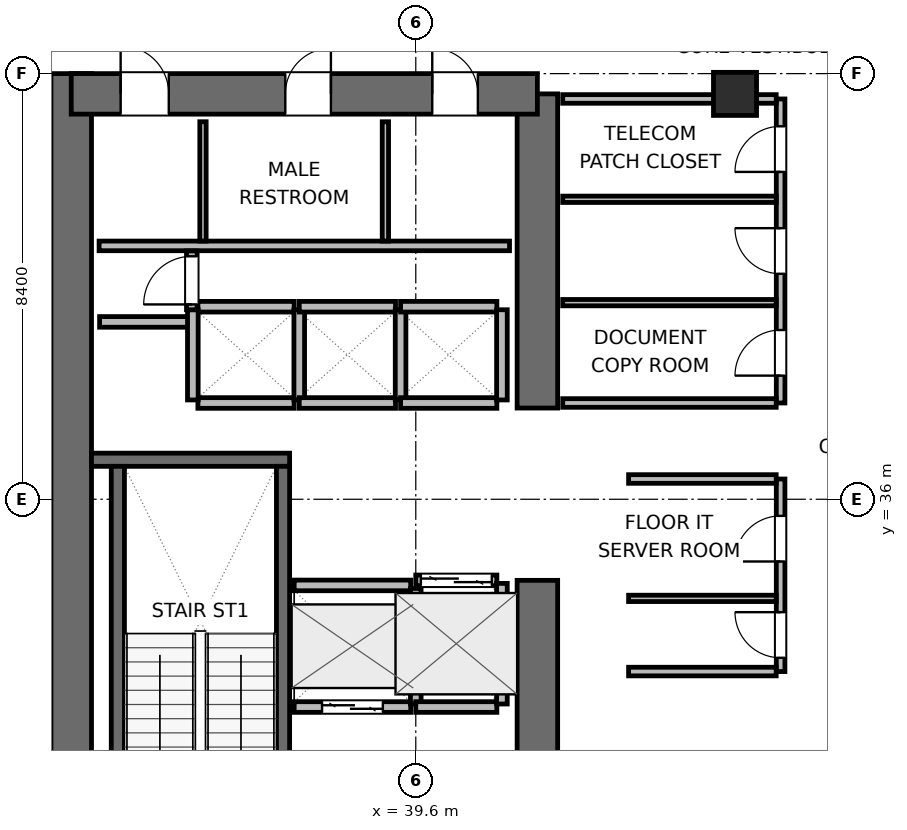
"""IFC4 building model, lengths in metres.
Left out: names, types, materials, properties, quantities, classifications, styles, units other than length and angle.
Written with IfcOpenShell. Run it as: python <this file> out.ifc"""

import sys

from ifc_helpers import new_model, si_unit, direction, frame, frame_2d, origin, origin_2d, place, context, subcontext, project, spatial, rectangle, extrude, element, fill, save


model = new_model("IFC4")
c1 = context("Model", 3, precision=1e-05, world=origin(), true_north=direction((0.0, 1.0)))
c2 = subcontext(c1, "Body", "Model", "MODEL_VIEW")
j1 = project(units=[si_unit("LENGTHUNIT", "METRE"), si_unit("PLANEANGLEUNIT", "RADIAN")], contexts=[c1])
p1 = place(None, origin())
s1 = spatial("IfcSite", under=j1, at=p1, CompositionType="ELEMENT")
p2 = place(p1, origin())
s2 = spatial("IfcBuilding", under=s1, at=p2, CompositionType="ELEMENT")
p3 = place(p2, frame((0.0, 0.0, 97.5)))
s3 = spatial("IfcBuildingStorey", under=s2, at=p3, CompositionType="ELEMENT", Elevation=97.5)
p4 = place(p3, frame((32.8, 27.6, 0.0), z_axis=(0.0, 0.0, 1.0), x_axis=(0.0, 1.0, 0.0)))
e1 = element("IfcWall", 1, at=p4, inside=s3, PredefinedType="SHEAR", context=c2, shape_type="SweptSolid", body=[
    extrude(rectangle(XDim=16.8, YDim=0.8, at=frame_2d((8.4, 0.0))), origin(), (0.0, 0.0, 1.0), 3.9),
])
p5 = place(p3, frame((42.0, 28.0, 0.0), z_axis=(0.0, 0.0, 1.0), x_axis=(0.0, 1.0, 0.0)))
e2 = element("IfcWall", 2, at=p5, inside=s3, PredefinedType="SHEAR", context=c2, shape_type="SweptSolid", body=[
    extrude(rectangle(XDim=6.4, YDim=0.8, at=frame_2d((3.2, 0.0))), origin(), (0.0, 0.0, 1.0), 3.9),
])
p6 = place(p3, frame((42.0, 37.8, 0.0), z_axis=(0.0, 0.0, 1.0), x_axis=(0.0, 1.0, 0.0)))
e3 = element("IfcWall", 3, at=p6, inside=s3, PredefinedType="SHEAR", context=c2, shape_type="SweptSolid", body=[
    extrude(rectangle(XDim=6.2, YDim=0.8, at=frame_2d((3.1, 0.0))), origin(), (0.0, 0.0, 1.0), 3.9),
])
p7 = place(p3, frame((32.8, 44.0, 0.0), z_axis=(0.0, 0.0, 1.0), x_axis=(1.0, 0.0, 0.0)))
e4 = element("IfcWall", 4, at=p7, inside=s3, PredefinedType="SHEAR", context=c2, shape_type="SweptSolid", body=[
    extrude(rectangle(XDim=9.2, YDim=0.8, at=frame_2d((4.6, 0.0))), origin(), (0.0, 0.0, 1.0), 3.9),
])
p8 = place(p7, frame((0.975, 0.0, 0.0)))
e5 = element("IfcOpeningElement", 5, at=p8, cuts=e4, PredefinedType="OPENING", context=c2, shape_type="SweptSolid", body=[
    extrude(rectangle(XDim=0.95, YDim=2.04, at=frame_2d((0.475, 1.02))), frame((0.0, 0.41, 0.0), z_axis=(0.0, -1.0, 0.0), x_axis=(1.0, 0.0, 0.0)), (0.0, 0.0, 1.0), 0.82),
])
p9 = place(p7, frame((4.225, 0.0, 0.0)))
e6 = element("IfcOpeningElement", 6, at=p9, cuts=e4, PredefinedType="OPENING", context=c2, shape_type="SweptSolid", body=[
    extrude(rectangle(XDim=0.9, YDim=2.02, at=frame_2d((0.45, 1.01))), frame((0.0, 0.41, 0.0), z_axis=(0.0, -1.0, 0.0), x_axis=(1.0, 0.0, 0.0)), (0.0, 0.0, 1.0), 0.82),
])
p10 = place(p7, frame((7.125, 0.0, 0.0)))
e7 = element("IfcOpeningElement", 7, at=p10, cuts=e4, PredefinedType="OPENING", context=c2, shape_type="SweptSolid", body=[
    extrude(rectangle(XDim=0.9, YDim=2.02, at=frame_2d((0.45, 1.01))), frame((0.0, 0.41, 0.0), z_axis=(0.0, -1.0, 0.0), x_axis=(1.0, 0.0, 0.0)), (0.0, 0.0, 1.0), 0.82),
])
p11 = place(p3, frame((33.2, 36.78, 0.0), z_axis=(0.0, 0.0, 1.0), x_axis=(1.0, 0.0, 0.0)))
e8 = element("IfcWall", 8, at=p11, inside=s3, PredefinedType="SHEAR", context=c2, shape_type="SweptSolid", body=[
    extrude(rectangle(XDim=3.91, YDim=0.26, at=frame_2d((1.955, 0.0))), origin(), (0.0, 0.0, 1.0), 3.9),
])
p12 = place(p3, frame((33.72, 29.05, 0.0), z_axis=(0.0, 0.0, 1.0), x_axis=(0.0, 1.0, 0.0)))
e9 = element("IfcWall", 9, at=p12, inside=s3, PredefinedType="SHEAR", context=c2, shape_type="SweptSolid", body=[
    extrude(rectangle(XDim=7.6, YDim=0.26, at=frame_2d((3.8, 0.0))), origin(), (0.0, 0.0, 1.0), 3.9),
])
p13 = place(p3, frame((36.98, 29.05, 0.0), z_axis=(0.0, 0.0, 1.0), x_axis=(0.0, 1.0, 0.0)))
e10 = element("IfcWall", 10, at=p13, inside=s3, PredefinedType="SHEAR", context=c2, shape_type="SweptSolid", body=[
    extrude(rectangle(XDim=7.6, YDim=0.26, at=frame_2d((3.8, 0.0))), origin(), (0.0, 0.0, 1.0), 3.9),
])
p14 = place(p13, frame((0.3, 0.0, 0.0)))
e11 = element("IfcOpeningElement", 11, at=p14, cuts=e10, PredefinedType="OPENING", context=c2, shape_type="SweptSolid", body=[
    extrude(rectangle(XDim=1.0, YDim=2.04, at=frame_2d((0.5, 1.02))), frame((0.0, 0.14, 0.0), z_axis=(0.0, -1.0, 0.0), x_axis=(1.0, 0.0, 0.0)), (0.0, 0.0, 1.0), 0.28),
])
p15 = place(p3, frame((45.9, 44.0, 0.0), z_axis=(0.0, 0.0, 1.0), x_axis=(1.0, 0.0, 0.0)))
e12 = element("IfcColumn", 12, at=p15, inside=s3, PredefinedType="COLUMN", context=c2, shape_type="SweptSolid", body=[
    extrude(rectangle(XDim=0.85, YDim=0.85, at=origin_2d()), origin(), (0.0, 0.0, 1.0), 3.9),
])
p16 = place(p3, frame((33.35, 41.0, 0.0), z_axis=(0.0, 0.0, 1.0), x_axis=(1.0, 0.0, 0.0)))
e13 = element("IfcWall", 13, at=p16, inside=s3, PredefinedType="PLUMBINGWALL", context=c2, shape_type="SweptSolid", body=[
    extrude(rectangle(XDim=8.1, YDim=0.19, at=frame_2d((4.05, 0.0))), origin(), (0.0, 0.0, 1.0), 3.64),
])
for number, where, z_axis, x_axis in (
    (14, (35.4, 41.095, 0.0), (0.0, 0.0, 1.0), (0.0, 1.0, 0.0)),
    (15, (39.0, 41.095, 0.0), (0.0, 0.0, 1.0), (0.0, 1.0, 0.0)),
):
    element("IfcWall", number, at=place(p3, frame(where, z_axis=z_axis, x_axis=x_axis)), inside=s3, PredefinedType="PARTITIONING", context=c2, shape_type="SweptSolid", body=[
        extrude(rectangle(XDim=2.355, YDim=0.125, at=frame_2d((1.177, 0.0))), origin(), (0.0, 0.0, 1.0), 3.64),
    ])
p17 = place(p3, frame((33.36, 39.5, 0.0), z_axis=(0.0, 0.0, 1.0), x_axis=(1.0, 0.0, 0.0)))
e16 = element("IfcWall", 16, at=p17, inside=s3, PredefinedType="PARTITIONING", context=c2, shape_type="SweptSolid", body=[
    extrude(rectangle(XDim=1.86, YDim=0.21, at=frame_2d((0.93, 0.0))), origin(), (0.0, 0.0, 1.0), 3.64),
])
p18 = place(p3, frame((37.2, 31.9, 0.0), z_axis=(0.0, 0.0, 1.0), x_axis=(1.0, 0.0, 0.0)))
e17 = element("IfcWall", 17, at=p18, inside=s3, PredefinedType="PARTITIONING", context=c2, shape_type="SweptSolid", body=[
    extrude(rectangle(XDim=2.3, YDim=0.21, at=frame_2d((1.15, 0.0))), origin(), (0.0, 0.0, 1.0), 3.64),
])
p19 = place(p18, frame((0.55, 0.0, 0.0)))
e18 = element("IfcOpeningElement", 18, at=p19, cuts=e17, PredefinedType="OPENING", context=c2, shape_type="SweptSolid", body=[
    extrude(rectangle(XDim=1.2, YDim=2.04, at=frame_2d((0.6, 1.02))), frame((0.0, 0.115, 0.0), z_axis=(0.0, -1.0, 0.0), x_axis=(1.0, 0.0, 0.0)), (0.0, 0.0, 1.0), 0.23),
])
p20 = place(p3, frame((37.2, 34.3, 0.0), z_axis=(0.0, 0.0, 1.0), x_axis=(1.0, 0.0, 0.0)))
e19 = element("IfcWall", 19, at=p20, inside=s3, PredefinedType="PARTITIONING", context=c2, shape_type="SweptSolid", body=[
    extrude(rectangle(XDim=2.3, YDim=0.21, at=frame_2d((1.15, 0.0))), origin(), (0.0, 0.0, 1.0), 3.64),
])
p21 = place(p3, frame((39.6, 31.96, 0.0), z_axis=(0.0, 0.0, 1.0), x_axis=(0.0, 1.0, 0.0)))
e20 = element("IfcWall", 20, at=p21, inside=s3, PredefinedType="PARTITIONING", context=c2, shape_type="SweptSolid", body=[
    extrude(rectangle(XDim=2.28, YDim=0.21, at=frame_2d((1.14, 0.0))), origin(), (0.0, 0.0, 1.0), 3.64),
])
p22 = place(p3, frame((39.6, 34.4, 0.0), z_axis=(0.0, 0.0, 1.0), x_axis=(1.0, 0.0, 0.0)))
e21 = element("IfcWall", 21, at=p22, inside=s3, PredefinedType="PARTITIONING", context=c2, shape_type="SweptSolid", body=[
    extrude(rectangle(XDim=1.6, YDim=0.21, at=frame_2d((0.8, 0.0))), origin(), (0.0, 0.0, 1.0), 3.64),
])
p23 = place(p22, frame((0.1, 0.0, 0.0)))
e22 = element("IfcOpeningElement", 22, at=p23, cuts=e21, PredefinedType="OPENING", context=c2, shape_type="SweptSolid", body=[
    extrude(rectangle(XDim=1.4, YDim=2.06, at=frame_2d((0.7, 1.03))), frame((0.0, 0.115, 0.0), z_axis=(0.0, -1.0, 0.0), x_axis=(1.0, 0.0, 0.0)), (0.0, 0.0, 1.0), 0.23),
])
p24 = place(p3, frame((39.6, 31.9, 0.0), z_axis=(0.0, 0.0, 1.0), x_axis=(1.0, 0.0, 0.0)))
e23 = element("IfcWall", 23, at=p24, inside=s3, PredefinedType="PARTITIONING", context=c2, shape_type="SweptSolid", body=[
    extrude(rectangle(XDim=1.6, YDim=0.21, at=frame_2d((0.8, 0.0))), origin(), (0.0, 0.0, 1.0), 3.64),
])
p25 = place(p3, frame((41.3, 31.96, 0.0), z_axis=(0.0, 0.0, 1.0), x_axis=(0.0, 1.0, 0.0)))
e24 = element("IfcWall", 24, at=p25, inside=s3, PredefinedType="PARTITIONING", context=c2, shape_type="SweptSolid", body=[
    extrude(rectangle(XDim=2.38, YDim=0.21, at=frame_2d((1.19, 0.0))), origin(), (0.0, 0.0, 1.0), 3.64),
])
for number, where, z_axis, x_axis in (
    (25, (35.3, 37.9, 0.0), (0.0, 0.0, 1.0), (1.0, 0.0, 0.0)),
    (26, (35.3, 39.8, 0.0), (0.0, 0.0, 1.0), (1.0, 0.0, 0.0)),
):
    element("IfcWall", number, at=place(p3, frame(where, z_axis=z_axis, x_axis=x_axis)), inside=s3, PredefinedType="PARTITIONING", context=c2, shape_type="SweptSolid", body=[
        extrude(rectangle(XDim=1.9, YDim=0.21, at=frame_2d((0.95, 0.0))), origin(), (0.0, 0.0, 1.0), 3.64),
    ])
for number, where, z_axis, x_axis in (
    (27, (35.2, 37.96, 0.0), (0.0, 0.0, 1.0), (0.0, 1.0, 0.0)),
    (28, (37.3, 37.96, 0.0), (0.0, 0.0, 1.0), (0.0, 1.0, 0.0)),
):
    element("IfcWall", number, at=place(p3, frame(where, z_axis=z_axis, x_axis=x_axis)), inside=s3, PredefinedType="PARTITIONING", context=c2, shape_type="SweptSolid", body=[
        extrude(rectangle(XDim=1.78, YDim=0.21, at=frame_2d((0.89, 0.0))), origin(), (0.0, 0.0, 1.0), 3.64),
    ])
for number, where, z_axis, x_axis in (
    (29, (37.3, 37.9, 0.0), (0.0, 0.0, 1.0), (1.0, 0.0, 0.0)),
    (30, (37.3, 39.8, 0.0), (0.0, 0.0, 1.0), (1.0, 0.0, 0.0)),
):
    element("IfcWall", number, at=place(p3, frame(where, z_axis=z_axis, x_axis=x_axis)), inside=s3, PredefinedType="PARTITIONING", context=c2, shape_type="SweptSolid", body=[
        extrude(rectangle(XDim=1.9, YDim=0.21, at=frame_2d((0.95, 0.0))), origin(), (0.0, 0.0, 1.0), 3.64),
    ])
p26 = place(p3, frame((39.3, 37.96, 0.0), z_axis=(0.0, 0.0, 1.0), x_axis=(0.0, 1.0, 0.0)))
e31 = element("IfcWall", 31, at=p26, inside=s3, PredefinedType="PARTITIONING", context=c2, shape_type="SweptSolid", body=[
    extrude(rectangle(XDim=1.78, YDim=0.21, at=frame_2d((0.89, 0.0))), origin(), (0.0, 0.0, 1.0), 3.64),
])
for number, where, z_axis, x_axis in (
    (32, (39.3, 37.9, 0.0), (0.0, 0.0, 1.0), (1.0, 0.0, 0.0)),
    (33, (39.3, 39.8, 0.0), (0.0, 0.0, 1.0), (1.0, 0.0, 0.0)),
):
    element("IfcWall", number, at=place(p3, frame(where, z_axis=z_axis, x_axis=x_axis)), inside=s3, PredefinedType="PARTITIONING", context=c2, shape_type="SweptSolid", body=[
        extrude(rectangle(XDim=1.9, YDim=0.21, at=frame_2d((0.95, 0.0))), origin(), (0.0, 0.0, 1.0), 3.64),
    ])
p27 = place(p3, frame((41.3, 37.96, 0.0), z_axis=(0.0, 0.0, 1.0), x_axis=(0.0, 1.0, 0.0)))
e34 = element("IfcWall", 34, at=p27, inside=s3, PredefinedType="PARTITIONING", context=c2, shape_type="SweptSolid", body=[
    extrude(rectangle(XDim=1.78, YDim=0.21, at=frame_2d((0.89, 0.0))), origin(), (0.0, 0.0, 1.0), 3.64),
])
p28 = place(p3, frame((35.18, 39.74, 0.0), z_axis=(0.0, 0.0, 1.0), x_axis=(0.0, 1.0, 0.0)))
e35 = element("IfcWall", 35, at=p28, inside=s3, PredefinedType="PARTITIONING", context=c2, shape_type="SweptSolid", body=[
    extrude(rectangle(XDim=1.16, YDim=0.21, at=frame_2d((0.58, 0.0))), origin(), (0.0, 0.0, 1.0), 3.64),
])
p29 = place(p28, frame((0.105, 0.0, 0.0)))
e36 = element("IfcOpeningElement", 36, at=p29, cuts=e35, PredefinedType="OPENING", context=c2, shape_type="SweptSolid", body=[
    extrude(rectangle(XDim=0.95, YDim=2.04, at=frame_2d((0.475, 1.02))), frame((0.0, 0.115, 0.0), z_axis=(0.0, -1.0, 0.0), x_axis=(1.0, 0.0, 0.0)), (0.0, 0.0, 1.0), 0.23),
])
p30 = place(p3, frame((46.8, 32.6, 0.0), z_axis=(0.0, 0.0, 1.0), x_axis=(0.0, 1.0, 0.0)))
e37 = element("IfcWall", 37, at=p30, inside=s3, PredefinedType="PARTITIONING", context=c2, shape_type="SweptSolid", body=[
    extrude(rectangle(XDim=3.8, YDim=0.17, at=frame_2d((1.9, 0.0))), origin(), (0.0, 0.0, 1.0), 3.64),
])
p31 = place(p30, frame((0.272, 0.0, 0.0)))
e38 = element("IfcOpeningElement", 38, at=p31, cuts=e37, PredefinedType="OPENING", context=c2, shape_type="SweptSolid", body=[
    extrude(rectangle(XDim=0.9, YDim=2.02, at=frame_2d((0.45, 1.01))), frame((0.0, 0.095, 0.0), z_axis=(0.0, -1.0, 0.0), x_axis=(1.0, 0.0, 0.0)), (0.0, 0.0, 1.0), 0.19),
])
p32 = place(p30, frame((2.172, 0.0, 0.0)))
e39 = element("IfcOpeningElement", 39, at=p32, cuts=e37, PredefinedType="OPENING", context=c2, shape_type="SweptSolid", body=[
    extrude(rectangle(XDim=0.9, YDim=2.02, at=frame_2d((0.45, 1.01))), frame((0.0, 0.095, 0.0), z_axis=(0.0, -1.0, 0.0), x_axis=(1.0, 0.0, 0.0)), (0.0, 0.0, 1.0), 0.19),
])
for number, where, z_axis, x_axis in (
    (40, (43.8, 32.6, 0.0), (0.0, 0.0, 1.0), (1.0, 0.0, 0.0)),
    (41, (43.8, 36.4, 0.0), (0.0, 0.0, 1.0), (1.0, 0.0, 0.0)),
):
    element("IfcWall", number, at=place(p3, frame(where, z_axis=z_axis, x_axis=x_axis)), inside=s3, PredefinedType="PARTITIONING", context=c2, shape_type="SweptSolid", body=[
        extrude(rectangle(XDim=2.913, YDim=0.17, at=frame_2d((1.457, 0.0))), origin(), (0.0, 0.0, 1.0), 3.64),
    ])
p33 = place(p3, frame((43.8, 34.044, 0.0), z_axis=(0.0, 0.0, 1.0), x_axis=(1.0, 0.0, 0.0)))
e42 = element("IfcWall", 42, at=p33, inside=s3, PredefinedType="PARTITIONING", context=c2, shape_type="SweptSolid", body=[
    extrude(rectangle(XDim=2.913, YDim=0.125, at=frame_2d((1.457, 0.0))), origin(), (0.0, 0.0, 1.0), 3.64),
])
p34 = place(p3, frame((46.8, 37.9, 0.0), z_axis=(0.0, 0.0, 1.0), x_axis=(0.0, 1.0, 0.0)))
e43 = element("IfcWall", 43, at=p34, inside=s3, PredefinedType="PARTITIONING", context=c2, shape_type="SweptSolid", body=[
    extrude(rectangle(XDim=6.0, YDim=0.17, at=frame_2d((3.0, 0.0))), origin(), (0.0, 0.0, 1.0), 3.64),
])
p35 = place(p34, frame((0.54, 0.0, 0.0)))
e44 = element("IfcOpeningElement", 44, at=p35, cuts=e43, PredefinedType="OPENING", context=c2, shape_type="SweptSolid", body=[
    extrude(rectangle(XDim=0.9, YDim=2.02, at=frame_2d((0.45, 1.01))), frame((0.0, 0.095, 0.0), z_axis=(0.0, -1.0, 0.0), x_axis=(1.0, 0.0, 0.0)), (0.0, 0.0, 1.0), 0.19),
])
p36 = place(p34, frame((2.55, 0.0, 0.0)))
e45 = element("IfcOpeningElement", 45, at=p36, cuts=e43, PredefinedType="OPENING", context=c2, shape_type="SweptSolid", body=[
    extrude(rectangle(XDim=0.9, YDim=2.02, at=frame_2d((0.45, 1.01))), frame((0.0, 0.095, 0.0), z_axis=(0.0, -1.0, 0.0), x_axis=(1.0, 0.0, 0.0)), (0.0, 0.0, 1.0), 0.19),
])
p37 = place(p34, frame((4.56, 0.0, 0.0)))
e46 = element("IfcOpeningElement", 46, at=p37, cuts=e43, PredefinedType="OPENING", context=c2, shape_type="SweptSolid", body=[
    extrude(rectangle(XDim=0.9, YDim=2.02, at=frame_2d((0.45, 1.01))), frame((0.0, 0.095, 0.0), z_axis=(0.0, -1.0, 0.0), x_axis=(1.0, 0.0, 0.0)), (0.0, 0.0, 1.0), 0.19),
])
p38 = place(p3, frame((42.5, 37.9, 0.0), z_axis=(0.0, 0.0, 1.0), x_axis=(1.0, 0.0, 0.0)))
e47 = element("IfcWall", 47, at=p38, inside=s3, PredefinedType="PARTITIONING", context=c2, shape_type="SweptSolid", body=[
    extrude(rectangle(XDim=4.213, YDim=0.17, at=frame_2d((2.106, 0.0))), origin(), (0.0, 0.0, 1.0), 3.64),
])
p39 = place(p3, frame((42.5, 43.9, 0.0), z_axis=(0.0, 0.0, 1.0), x_axis=(1.0, 0.0, 0.0)))
e48 = element("IfcWall", 48, at=p39, inside=s3, PredefinedType="PARTITIONING", context=c2, shape_type="SweptSolid", body=[
    extrude(rectangle(XDim=4.213, YDim=0.17, at=frame_2d((2.106, 0.0))), origin(), (0.0, 0.0, 1.0), 2.525),
])
for number, where, z_axis, x_axis in (
    (49, (42.5, 39.88, 0.0), (0.0, 0.0, 1.0), (1.0, 0.0, 0.0)),
    (50, (42.5, 41.92, 0.0), (0.0, 0.0, 1.0), (1.0, 0.0, 0.0)),
):
    element("IfcWall", number, at=place(p3, frame(where, z_axis=z_axis, x_axis=x_axis)), inside=s3, PredefinedType="PARTITIONING", context=c2, shape_type="SweptSolid", body=[
        extrude(rectangle(XDim=4.213, YDim=0.125, at=frame_2d((2.106, 0.0))), origin(), (0.0, 0.0, 1.0), 3.64),
    ])
p40 = place(p19, origin())
e51 = element("IfcDoor", 51, at=p40, inside=s3, OperationType="DOUBLE_DOOR_SLIDING", PredefinedType="DOOR", context=c2, shape_type="SweptSolid", body=[
    extrude(rectangle(XDim=1.2, YDim=2.04, at=frame_2d((0.6, 1.02))), frame((0.0, 0.025, 0.0), z_axis=(0.0, -1.0, 0.0), x_axis=(1.0, 0.0, 0.0)), (0.0, 0.0, 1.0), 0.05),
])
fill(e18, e51)
p41 = place(p23, origin())
e52 = element("IfcDoor", 52, at=p41, inside=s3, OperationType="DOUBLE_DOOR_SLIDING", PredefinedType="DOOR", context=c2, shape_type="SweptSolid", body=[
    extrude(rectangle(XDim=1.4, YDim=2.06, at=frame_2d((0.7, 1.03))), frame((0.0, 0.025, 0.0), z_axis=(0.0, -1.0, 0.0), x_axis=(1.0, 0.0, 0.0)), (0.0, 0.0, 1.0), 0.05),
])
fill(e22, e52)
p42 = place(p8, origin())
e53 = element("IfcDoor", 53, at=p42, inside=s3, OperationType="SINGLE_SWING_LEFT", PredefinedType="DOOR", context=c2, shape_type="SweptSolid", body=[
    extrude(rectangle(XDim=0.95, YDim=2.04, at=frame_2d((0.475, 1.02))), frame((0.0, 0.025, 0.0), z_axis=(0.0, -1.0, 0.0), x_axis=(1.0, 0.0, 0.0)), (0.0, 0.0, 1.0), 0.05),
])
fill(e5, e53)
p43 = place(p9, origin())
e54 = element("IfcDoor", 54, at=p43, inside=s3, OperationType="SINGLE_SWING_RIGHT", PredefinedType="DOOR", context=c2, shape_type="SweptSolid", body=[
    extrude(rectangle(XDim=0.9, YDim=2.02, at=frame_2d((0.45, 1.01))), frame((0.0, 0.025, 0.0), z_axis=(0.0, -1.0, 0.0), x_axis=(1.0, 0.0, 0.0)), (0.0, 0.0, 1.0), 0.05),
])
fill(e6, e54)
p44 = place(p10, origin())
e55 = element("IfcDoor", 55, at=p44, inside=s3, OperationType="SINGLE_SWING_LEFT", PredefinedType="DOOR", context=c2, shape_type="SweptSolid", body=[
    extrude(rectangle(XDim=0.9, YDim=2.02, at=frame_2d((0.45, 1.01))), frame((0.0, 0.025, 0.0), z_axis=(0.0, -1.0, 0.0), x_axis=(1.0, 0.0, 0.0)), (0.0, 0.0, 1.0), 0.05),
])
fill(e7, e55)
p45 = place(p29, origin())
e56 = element("IfcDoor", 56, at=p45, inside=s3, OperationType="SINGLE_SWING_LEFT", PredefinedType="DOOR", context=c2, shape_type="SweptSolid", body=[
    extrude(rectangle(XDim=0.95, YDim=2.04, at=frame_2d((0.475, 1.02))), frame((0.0, 0.025, 0.0), z_axis=(0.0, -1.0, 0.0), x_axis=(1.0, 0.0, 0.0)), (0.0, 0.0, 1.0), 0.05),
])
fill(e36, e56)
p46 = place(p31, origin())
e57 = element("IfcDoor", 57, at=p46, inside=s3, OperationType="SINGLE_SWING_RIGHT", PredefinedType="DOOR", context=c2, shape_type="SweptSolid", body=[
    extrude(rectangle(XDim=0.9, YDim=2.02, at=frame_2d((0.45, 1.01))), frame((0.0, 0.025, 0.0), z_axis=(0.0, -1.0, 0.0), x_axis=(1.0, 0.0, 0.0)), (0.0, 0.0, 1.0), 0.05),
])
fill(e38, e57)
p47 = place(p32, origin())
e58 = element("IfcDoor", 58, at=p47, inside=s3, OperationType="SINGLE_SWING_LEFT", PredefinedType="DOOR", context=c2, shape_type="SweptSolid", body=[
    extrude(rectangle(XDim=0.9, YDim=2.02, at=frame_2d((0.45, 1.01))), frame((0.0, 0.025, 0.0), z_axis=(0.0, -1.0, 0.0), x_axis=(1.0, 0.0, 0.0)), (0.0, 0.0, 1.0), 0.05),
])
fill(e39, e58)
p48 = place(p35, origin())
e59 = element("IfcDoor", 59, at=p48, inside=s3, OperationType="SINGLE_SWING_LEFT", PredefinedType="DOOR", context=c2, shape_type="SweptSolid", body=[
    extrude(rectangle(XDim=0.9, YDim=2.02, at=frame_2d((0.45, 1.01))), frame((0.0, 0.025, 0.0), z_axis=(0.0, -1.0, 0.0), x_axis=(1.0, 0.0, 0.0)), (0.0, 0.0, 1.0), 0.05),
])
fill(e44, e59)
p49 = place(p36, origin())
e60 = element("IfcDoor", 60, at=p49, inside=s3, OperationType="SINGLE_SWING_RIGHT", PredefinedType="DOOR", context=c2, shape_type="SweptSolid", body=[
    extrude(rectangle(XDim=0.9, YDim=2.02, at=frame_2d((0.45, 1.01))), frame((0.0, 0.025, 0.0), z_axis=(0.0, -1.0, 0.0), x_axis=(1.0, 0.0, 0.0)), (0.0, 0.0, 1.0), 0.05),
])
fill(e45, e60)
p50 = place(p37, origin())
e61 = element("IfcDoor", 61, at=p50, inside=s3, OperationType="SINGLE_SWING_LEFT", PredefinedType="DOOR", context=c2, shape_type="SweptSolid", body=[
    extrude(rectangle(XDim=0.9, YDim=2.02, at=frame_2d((0.45, 1.01))), frame((0.0, 0.025, 0.0), z_axis=(0.0, -1.0, 0.0), x_axis=(1.0, 0.0, 0.0)), (0.0, 0.0, 1.0), 0.05),
])
fill(e46, e61)
save(model, sys.argv[1])
